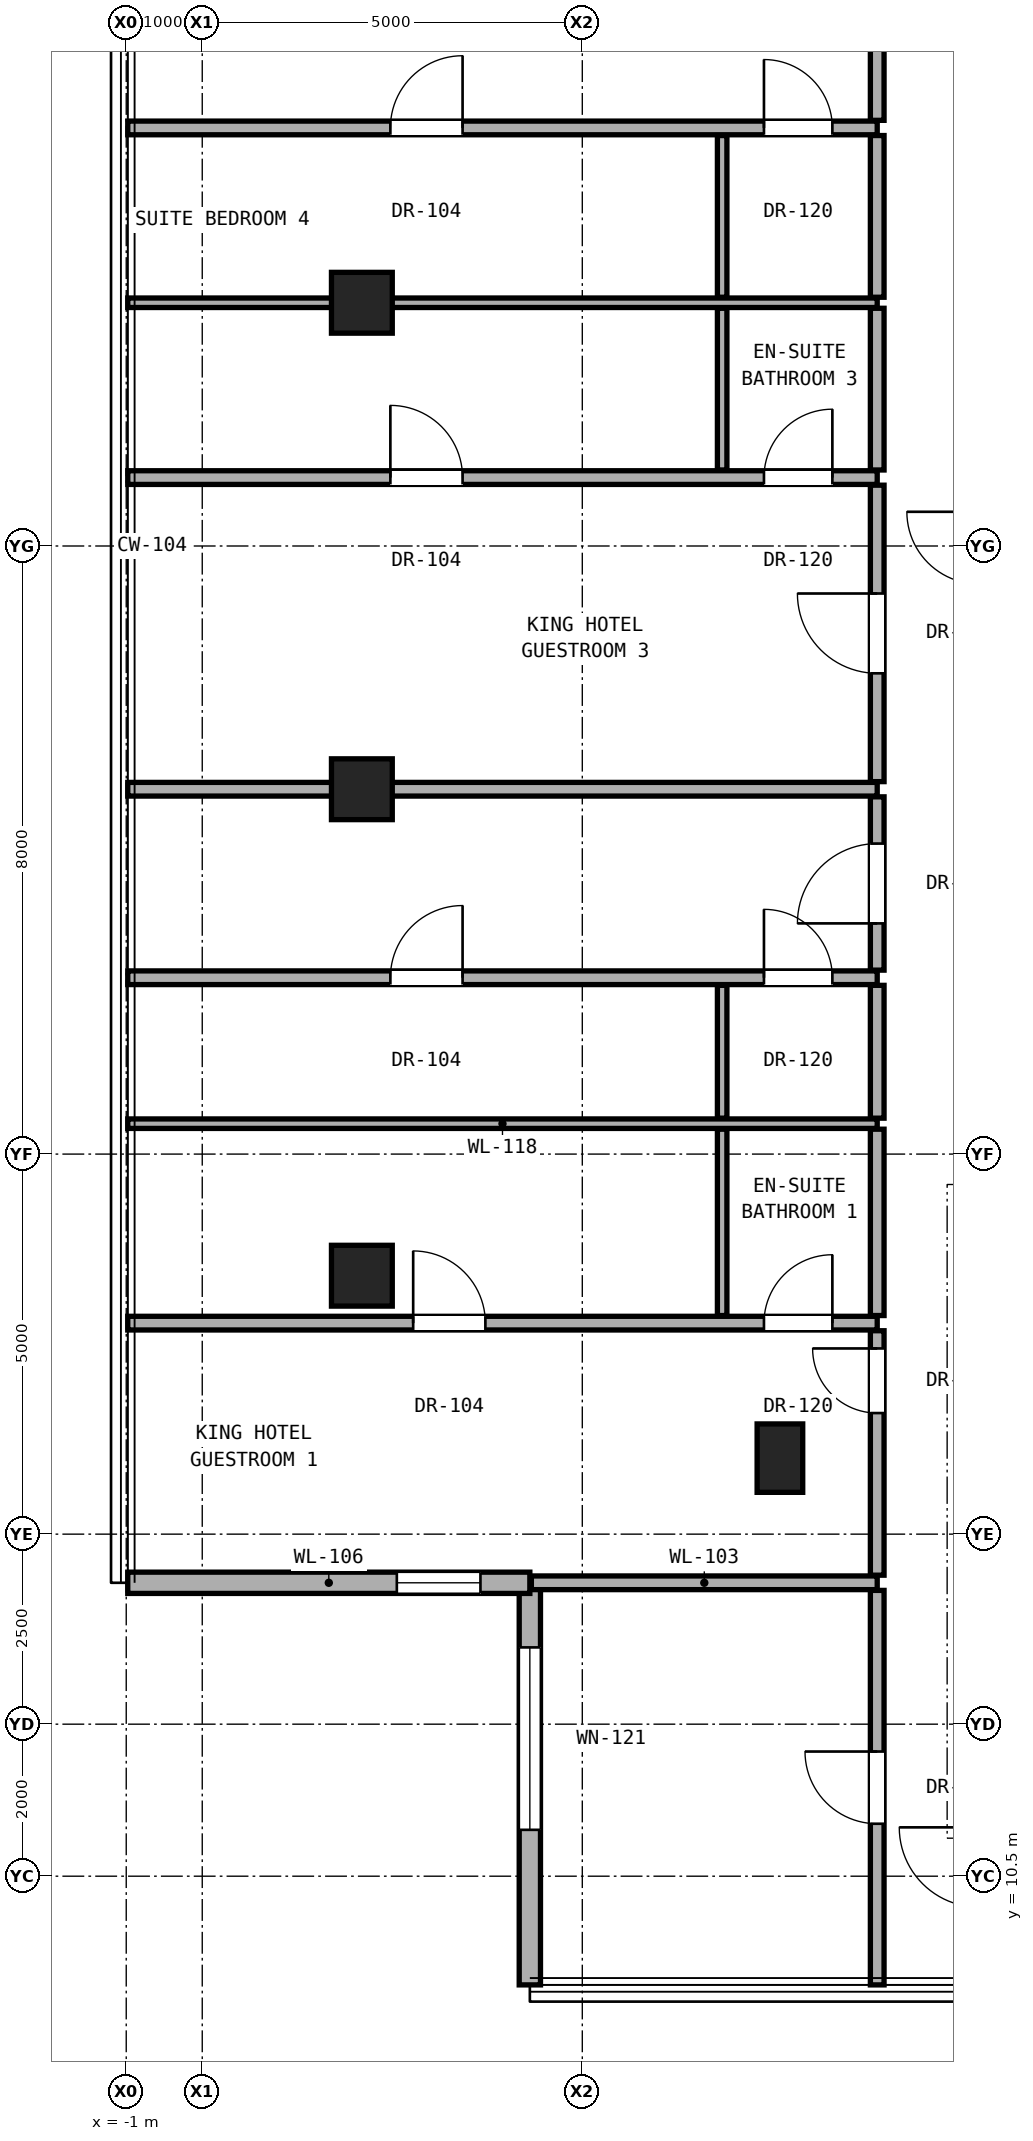
"""IFC4 building model, lengths in metres.
Left out: names, types, materials, properties, quantities, classifications, styles, units other than length and angle.
Written with IfcOpenShell. Run it as: python <this file> out.ifc"""

import sys

from ifc_helpers import new_model, si_unit, direction, frame, frame_2d, origin, origin_2d, place, context, subcontext, project, spatial, rectangle, hollow_rectangle, extrude, element, fill, save


model = new_model("IFC4")
c1 = context("Model", 3, precision=1e-05, world=origin(), true_north=direction((0.0, 1.0)))
c2 = subcontext(c1, "Body", "Model", "MODEL_VIEW")
j1 = project(units=[si_unit("LENGTHUNIT", "METRE"), si_unit("PLANEANGLEUNIT", "RADIAN")], contexts=[c1])
p1 = place(None, origin())
s1 = spatial("IfcSite", under=j1, at=p1, CompositionType="ELEMENT")
p2 = place(p1, origin())
s2 = spatial("IfcBuilding", under=s1, at=p2, CompositionType="ELEMENT")
p3 = place(p2, frame((0.0, 0.0, 235.9)))
s3 = spatial("IfcBuildingStorey", under=s2, at=p3, CompositionType="ELEMENT", Elevation=235.9)
for number, where, z_axis, x_axis in (
    (1, (2.1, 18.4, 0.0), (0.0, 0.0, 1.0), (1.0, 0.0, 0.0)),
    (2, (2.1, 24.8, 0.0), (0.0, 0.0, 1.0), (1.0, 0.0, 0.0)),
    (3, (2.1, 31.2, 0.0), (0.0, 0.0, 1.0), (1.0, 0.0, 0.0)),
):
    element("IfcColumn", number, at=place(p3, frame(where, z_axis=z_axis, x_axis=x_axis)), inside=s3, PredefinedType="COLUMN", context=c2, shape_type="SweptSolid", body=[
        extrude(hollow_rectangle(XDim=0.8, YDim=0.8, WallThickness=0.045, at=origin_2d()), origin(), (0.0, 0.0, 1.0), 3.3),
    ])
p4 = place(p3, frame((7.6, 16.0, 0.0), z_axis=(0.0, 0.0, 1.0), x_axis=(1.0, 0.0, 0.0)))
e4 = element("IfcColumn", 4, at=p4, inside=s3, PredefinedType="PILASTER", context=c2, shape_type="SweptSolid", body=[
    extrude(rectangle(XDim=0.6, YDim=0.9, at=origin_2d()), origin(), (0.0, 0.0, 1.0), 3.3),
])
p5 = place(p3, frame((4.31, 14.36, 0.0), z_axis=(0.0, 0.0, 1.0), x_axis=(0.0, -1.0, 0.0)))
e5 = element("IfcWall", 5, at=p5, inside=s3, PredefinedType="SOLIDWALL", context=c2, shape_type="SweptSolid", body=[
    extrude(rectangle(XDim=5.29, YDim=0.28, at=frame_2d((2.645, 0.0))), origin(), (0.0, 0.0, 1.0), 3.08),
])
p6 = place(p5, frame((0.85, 0.0, 0.58)))
e6 = element("IfcOpeningElement", 6, at=p6, cuts=e5, PredefinedType="OPENING", context=c2, shape_type="SweptSolid", body=[
    extrude(rectangle(XDim=2.4, YDim=2.35, at=frame_2d((1.2, 1.175))), frame((0.0, 0.15, 0.0), z_axis=(0.0, -1.0, 0.0), x_axis=(1.0, 0.0, 0.0)), (0.0, 0.0, 1.0), 0.3),
])
p7 = place(p3, frame((-0.98, 14.36, 0.0), z_axis=(0.0, 0.0, 1.0), x_axis=(1.0, 0.0, 0.0)))
e7 = element("IfcWall", 7, at=p7, inside=s3, PredefinedType="SOLIDWALL", context=c2, shape_type="SweptSolid", body=[
    extrude(rectangle(XDim=5.29, YDim=0.28, at=frame_2d((2.645, 0.0))), origin(), (0.0, 0.0, 1.0), 3.08),
])
p8 = place(p7, frame((3.54, 0.0, 0.85)))
e8 = element("IfcOpeningElement", 8, at=p8, cuts=e7, PredefinedType="OPENING", context=c2, shape_type="SweptSolid", body=[
    extrude(rectangle(XDim=1.1, YDim=2.0, at=frame_2d((0.55, 1.0))), frame((0.0, 0.15, 0.0), z_axis=(0.0, -1.0, 0.0), x_axis=(1.0, 0.0, 0.0)), (0.0, 0.0, 1.0), 0.3),
])
p9 = place(p3, frame((4.33, 14.36, 0.0), z_axis=(0.0, 0.0, 1.0), x_axis=(1.0, 0.0, 0.0)))
e9 = element("IfcWall", 9, at=p9, inside=s3, PredefinedType="PARTITIONING", context=c2, shape_type="SweptSolid", body=[
    extrude(rectangle(XDim=4.55, YDim=0.18, at=frame_2d((2.275, 0.0))), origin(), (0.0, 0.0, 1.0), 3.1),
])
p10 = place(p3, frame((-0.98, 17.776, 0.0), z_axis=(0.0, 0.0, 1.0), x_axis=(1.0, 0.0, 0.0)))
e10 = element("IfcWall", 10, at=p10, inside=s3, PredefinedType="PARTITIONING", context=c2, shape_type="SweptSolid", body=[
    extrude(rectangle(XDim=9.86, YDim=0.18, at=frame_2d((4.93, 0.0))), origin(), (0.0, 0.0, 1.0), 2.543),
])
p11 = place(p10, frame((3.755, 0.0, 0.0)))
e11 = element("IfcOpeningElement", 11, at=p11, cuts=e10, PredefinedType="OPENING", context=c2, shape_type="SweptSolid", body=[
    extrude(rectangle(XDim=0.95, YDim=2.15, at=frame_2d((0.475, 1.075))), frame((0.0, 0.1, 0.0), z_axis=(0.0, -1.0, 0.0), x_axis=(1.0, 0.0, 0.0)), (0.0, 0.0, 1.0), 0.2),
])
p12 = place(p10, frame((8.37, 0.0, 0.0)))
e12 = element("IfcOpeningElement", 12, at=p12, cuts=e10, PredefinedType="OPENING", context=c2, shape_type="SweptSolid", body=[
    extrude(rectangle(XDim=0.9, YDim=2.1, at=frame_2d((0.45, 1.05))), frame((0.0, 0.1, 0.0), z_axis=(0.0, -1.0, 0.0), x_axis=(1.0, 0.0, 0.0)), (0.0, 0.0, 1.0), 0.2),
])
p13 = place(p3, frame((-0.98, 20.4, 0.0), z_axis=(0.0, 0.0, 1.0), x_axis=(1.0, 0.0, 0.0)))
e13 = element("IfcWall", 13, at=p13, inside=s3, PredefinedType="PARTITIONING", context=c2, shape_type="SweptSolid", body=[
    extrude(rectangle(XDim=9.86, YDim=0.125, at=frame_2d((4.93, 0.0))), origin(), (0.0, 0.0, 1.0), 2.319),
])
p14 = place(p3, frame((-0.98, 22.32, 0.0), z_axis=(0.0, 0.0, 1.0), x_axis=(1.0, 0.0, 0.0)))
e14 = element("IfcWall", 14, at=p14, inside=s3, PredefinedType="PARTITIONING", context=c2, shape_type="SweptSolid", body=[
    extrude(rectangle(XDim=9.86, YDim=0.18, at=frame_2d((4.93, 0.0))), origin(), (0.0, 0.0, 1.0), 2.319),
])
p15 = place(p14, frame((3.455, 0.0, 0.0)))
e15 = element("IfcOpeningElement", 15, at=p15, cuts=e14, PredefinedType="OPENING", context=c2, shape_type="SweptSolid", body=[
    extrude(rectangle(XDim=0.95, YDim=2.15, at=frame_2d((0.475, 1.075))), frame((0.0, 0.1, 0.0), z_axis=(0.0, -1.0, 0.0), x_axis=(1.0, 0.0, 0.0)), (0.0, 0.0, 1.0), 0.2),
])
p16 = place(p14, frame((8.37, 0.0, 0.0)))
e16 = element("IfcOpeningElement", 16, at=p16, cuts=e14, PredefinedType="OPENING", context=c2, shape_type="SweptSolid", body=[
    extrude(rectangle(XDim=0.9, YDim=2.1, at=frame_2d((0.45, 1.05))), frame((0.0, 0.1, 0.0), z_axis=(0.0, -1.0, 0.0), x_axis=(1.0, 0.0, 0.0)), (0.0, 0.0, 1.0), 0.2),
])
p17 = place(p3, frame((-0.98, 24.8, 0.0), z_axis=(0.0, 0.0, 1.0), x_axis=(1.0, 0.0, 0.0)))
e17 = element("IfcWall", 17, at=p17, inside=s3, PredefinedType="PARTITIONING", context=c2, shape_type="SweptSolid", body=[
    extrude(rectangle(XDim=9.86, YDim=0.18, at=frame_2d((4.93, 0.0))), origin(), (0.0, 0.0, 1.0), 2.319),
])
p18 = place(p3, frame((-0.98, 28.9, 0.0), z_axis=(0.0, 0.0, 1.0), x_axis=(1.0, 0.0, 0.0)))
e18 = element("IfcWall", 18, at=p18, inside=s3, PredefinedType="PARTITIONING", context=c2, shape_type="SweptSolid", body=[
    extrude(rectangle(XDim=9.86, YDim=0.18, at=frame_2d((4.93, 0.0))), origin(), (0.0, 0.0, 1.0), 2.319),
])
p19 = place(p18, frame((3.455, 0.0, 0.0)))
e19 = element("IfcOpeningElement", 19, at=p19, cuts=e18, PredefinedType="OPENING", context=c2, shape_type="SweptSolid", body=[
    extrude(rectangle(XDim=0.95, YDim=2.15, at=frame_2d((0.475, 1.075))), frame((0.0, 0.1, 0.0), z_axis=(0.0, -1.0, 0.0), x_axis=(1.0, 0.0, 0.0)), (0.0, 0.0, 1.0), 0.2),
])
p20 = place(p18, frame((8.37, 0.0, 0.0)))
e20 = element("IfcOpeningElement", 20, at=p20, cuts=e18, PredefinedType="OPENING", context=c2, shape_type="SweptSolid", body=[
    extrude(rectangle(XDim=0.9, YDim=2.1, at=frame_2d((0.45, 1.05))), frame((0.0, 0.1, 0.0), z_axis=(0.0, -1.0, 0.0), x_axis=(1.0, 0.0, 0.0)), (0.0, 0.0, 1.0), 0.2),
])
p21 = place(p3, frame((-0.98, 31.2, 0.0), z_axis=(0.0, 0.0, 1.0), x_axis=(1.0, 0.0, 0.0)))
e21 = element("IfcWall", 21, at=p21, inside=s3, PredefinedType="PARTITIONING", context=c2, shape_type="SweptSolid", body=[
    extrude(rectangle(XDim=9.86, YDim=0.125, at=frame_2d((4.93, 0.0))), origin(), (0.0, 0.0, 1.0), 2.319),
])
p22 = place(p3, frame((-0.98, 33.5, 0.0), z_axis=(0.0, 0.0, 1.0), x_axis=(1.0, 0.0, 0.0)))
e22 = element("IfcWall", 22, at=p22, inside=s3, PredefinedType="PARTITIONING", context=c2, shape_type="SweptSolid", body=[
    extrude(rectangle(XDim=9.86, YDim=0.18, at=frame_2d((4.93, 0.0))), origin(), (0.0, 0.0, 1.0), 2.319),
])
p23 = place(p22, frame((3.455, 0.0, 0.0)))
e23 = element("IfcOpeningElement", 23, at=p23, cuts=e22, PredefinedType="OPENING", context=c2, shape_type="SweptSolid", body=[
    extrude(rectangle(XDim=0.95, YDim=2.15, at=frame_2d((0.475, 1.075))), frame((0.0, 0.1, 0.0), z_axis=(0.0, -1.0, 0.0), x_axis=(1.0, 0.0, 0.0)), (0.0, 0.0, 1.0), 0.2),
])
p24 = place(p22, frame((8.37, 0.0, 0.0)))
e24 = element("IfcOpeningElement", 24, at=p24, cuts=e22, PredefinedType="OPENING", context=c2, shape_type="SweptSolid", body=[
    extrude(rectangle(XDim=0.9, YDim=2.1, at=frame_2d((0.45, 1.05))), frame((0.0, 0.1, 0.0), z_axis=(0.0, -1.0, 0.0), x_axis=(1.0, 0.0, 0.0)), (0.0, 0.0, 1.0), 0.2),
])
p25 = place(p3, frame((6.84, 17.876, 0.0), z_axis=(0.0, 0.0, 1.0), x_axis=(0.0, 1.0, 0.0)))
e25 = element("IfcWall", 25, at=p25, inside=s3, PredefinedType="PARTITIONING", context=c2, shape_type="SweptSolid", body=[
    extrude(rectangle(XDim=2.451, YDim=0.125, at=frame_2d((1.226, 0.0))), origin(), (0.0, 0.0, 1.0), 2.492),
])
p26 = place(p3, frame((6.84, 20.472, 0.0), z_axis=(0.0, 0.0, 1.0), x_axis=(0.0, 1.0, 0.0)))
e26 = element("IfcWall", 26, at=p26, inside=s3, PredefinedType="PARTITIONING", context=c2, shape_type="SweptSolid", body=[
    extrude(rectangle(XDim=1.748, YDim=0.125, at=frame_2d((0.874, 0.0))), origin(), (0.0, 0.0, 1.0), 3.1),
])
for number, where, z_axis, x_axis in (
    (27, (6.84, 29.0, 0.0), (0.0, 0.0, 1.0), (0.0, 1.0, 0.0)),
    (28, (6.84, 31.272, 0.0), (0.0, 0.0, 1.0), (0.0, 1.0, 0.0)),
):
    element("IfcWall", number, at=place(p3, frame(where, z_axis=z_axis, x_axis=x_axis)), inside=s3, PredefinedType="PARTITIONING", context=c2, shape_type="SweptSolid", body=[
        extrude(rectangle(XDim=2.127, YDim=0.125, at=frame_2d((1.064, 0.0))), origin(), (0.0, 0.0, 1.0), 2.396),
    ])
p27 = place(p3, frame((8.88, 9.07, 0.0), z_axis=(0.0, 0.0, 1.0), x_axis=(0.0, 1.0, 0.0)))
e29 = element("IfcWall", 29, at=p27, inside=s3, PredefinedType="PARTITIONING", context=c2, shape_type="SweptSolid", body=[
    extrude(rectangle(XDim=5.19, YDim=0.18, at=frame_2d((2.595, 0.0))), origin(), (0.0, 0.0, 1.0), 3.1),
])
p28 = place(p27, frame((2.12, 0.0, 0.0)))
e30 = element("IfcOpeningElement", 30, at=p28, cuts=e29, PredefinedType="OPENING", context=c2, shape_type="SweptSolid", body=[
    extrude(rectangle(XDim=0.95, YDim=2.15, at=frame_2d((0.475, 1.075))), frame((0.0, 0.1, 0.0), z_axis=(0.0, -1.0, 0.0), x_axis=(1.0, 0.0, 0.0)), (0.0, 0.0, 1.0), 0.2),
])
p29 = place(p3, frame((8.88, 14.46, 0.0), z_axis=(0.0, 0.0, 1.0), x_axis=(0.0, 1.0, 0.0)))
e31 = element("IfcWall", 31, at=p29, inside=s3, PredefinedType="PARTITIONING", context=c2, shape_type="SweptSolid", body=[
    extrude(rectangle(XDim=3.216, YDim=0.18, at=frame_2d((1.608, 0.0))), origin(), (0.0, 0.0, 1.0), 2.543),
])
p30 = place(p29, frame((2.133, 0.0, 0.0)))
e32 = element("IfcOpeningElement", 32, at=p30, cuts=e31, PredefinedType="OPENING", context=c2, shape_type="SweptSolid", body=[
    extrude(rectangle(XDim=0.85, YDim=2.01, at=frame_2d((0.425, 1.005))), frame((0.0, 0.1, 0.0), z_axis=(0.0, -1.0, 0.0), x_axis=(1.0, 0.0, 0.0)), (0.0, 0.0, 1.0), 0.2),
])
p31 = place(p3, frame((8.88, 17.876, 0.0), z_axis=(0.0, 0.0, 1.0), x_axis=(0.0, 1.0, 0.0)))
e33 = element("IfcWall", 33, at=p31, inside=s3, PredefinedType="PARTITIONING", context=c2, shape_type="SweptSolid", body=[
    extrude(rectangle(XDim=2.451, YDim=0.18, at=frame_2d((1.226, 0.0))), origin(), (0.0, 0.0, 1.0), 2.492),
])
p32 = place(p3, frame((8.88, 20.472, 0.0), z_axis=(0.0, 0.0, 1.0), x_axis=(0.0, 1.0, 0.0)))
e34 = element("IfcWall", 34, at=p32, inside=s3, PredefinedType="PARTITIONING", context=c2, shape_type="SweptSolid", body=[
    extrude(rectangle(XDim=1.748, YDim=0.18, at=frame_2d((0.874, 0.0))), origin(), (0.0, 0.0, 1.0), 3.1),
])
p33 = place(p3, frame((8.88, 22.42, 0.0), z_axis=(0.0, 0.0, 1.0), x_axis=(0.0, 1.0, 0.0)))
e35 = element("IfcWall", 35, at=p33, inside=s3, PredefinedType="PARTITIONING", context=c2, shape_type="SweptSolid", body=[
    extrude(rectangle(XDim=2.28, YDim=0.18, at=frame_2d((1.14, 0.0))), origin(), (0.0, 0.0, 1.0), 2.396),
])
p34 = place(p33, frame((0.615, 0.0, 0.0)))
e36 = element("IfcOpeningElement", 36, at=p34, cuts=e35, PredefinedType="OPENING", context=c2, shape_type="SweptSolid", body=[
    extrude(rectangle(XDim=1.05, YDim=2.2, at=frame_2d((0.525, 1.1))), frame((0.0, 0.1, 0.0), z_axis=(0.0, -1.0, 0.0), x_axis=(1.0, 0.0, 0.0)), (0.0, 0.0, 1.0), 0.2),
])
p35 = place(p3, frame((8.88, 24.9, 0.0), z_axis=(0.0, 0.0, 1.0), x_axis=(0.0, 1.0, 0.0)))
e37 = element("IfcWall", 37, at=p35, inside=s3, PredefinedType="PARTITIONING", context=c2, shape_type="SweptSolid", body=[
    extrude(rectangle(XDim=3.9, YDim=0.18, at=frame_2d((1.95, 0.0))), origin(), (0.0, 0.0, 1.0), 2.396),
])
p36 = place(p35, frame((1.425, 0.0, 0.0)))
e38 = element("IfcOpeningElement", 38, at=p36, cuts=e37, PredefinedType="OPENING", context=c2, shape_type="SweptSolid", body=[
    extrude(rectangle(XDim=1.05, YDim=2.2, at=frame_2d((0.525, 1.1))), frame((0.0, 0.1, 0.0), z_axis=(0.0, -1.0, 0.0), x_axis=(1.0, 0.0, 0.0)), (0.0, 0.0, 1.0), 0.2),
])
for number, where, z_axis, x_axis in (
    (39, (8.88, 29.0, 0.0), (0.0, 0.0, 1.0), (0.0, 1.0, 0.0)),
    (40, (8.88, 31.272, 0.0), (0.0, 0.0, 1.0), (0.0, 1.0, 0.0)),
):
    element("IfcWall", number, at=place(p3, frame(where, z_axis=z_axis, x_axis=x_axis)), inside=s3, PredefinedType="PARTITIONING", context=c2, shape_type="SweptSolid", body=[
        extrude(rectangle(XDim=2.127, YDim=0.18, at=frame_2d((1.064, 0.0))), origin(), (0.0, 0.0, 1.0), 2.396),
    ])
p37 = place(p3, frame((8.88, 33.6, 0.0), z_axis=(0.0, 0.0, 1.0), x_axis=(0.0, 1.0, 0.0)))
e41 = element("IfcWall", 41, at=p37, inside=s3, PredefinedType="PARTITIONING", context=c2, shape_type="SweptSolid", body=[
    extrude(rectangle(XDim=7.94, YDim=0.18, at=frame_2d((3.97, 0.0))), origin(), (0.0, 0.0, 1.0), 2.492),
])
p38 = place(p37, frame((3.445, 0.0, 0.0)))
e42 = element("IfcOpeningElement", 42, at=p38, cuts=e41, PredefinedType="OPENING", context=c2, shape_type="SweptSolid", body=[
    extrude(rectangle(XDim=1.05, YDim=2.2, at=frame_2d((0.525, 1.1))), frame((0.0, 0.1, 0.0), z_axis=(0.0, -1.0, 0.0), x_axis=(1.0, 0.0, 0.0)), (0.0, 0.0, 1.0), 0.2),
])
p39 = place(p6, origin())
e43 = element("IfcWindow", 43, at=p39, inside=s3, PartitioningType="SINGLE_PANEL", PredefinedType="WINDOW", context=c2, shape_type="SweptSolid", body=[
    extrude(rectangle(XDim=2.4, YDim=2.35, at=frame_2d((1.2, 1.175))), frame((0.0, 0.03, 0.0), z_axis=(0.0, -1.0, 0.0), x_axis=(1.0, 0.0, 0.0)), (0.0, 0.0, 1.0), 0.06),
])
fill(e6, e43)
p40 = place(p8, origin())
e44 = element("IfcWindow", 44, at=p40, inside=s3, PartitioningType="SINGLE_PANEL", PredefinedType="WINDOW", context=c2, shape_type="SweptSolid", body=[
    extrude(rectangle(XDim=1.1, YDim=2.0, at=frame_2d((0.55, 1.0))), frame((0.0, 0.03, 0.0), z_axis=(0.0, -1.0, 0.0), x_axis=(1.0, 0.0, 0.0)), (0.0, 0.0, 1.0), 0.06),
])
fill(e8, e44)
p41 = place(p30, origin())
e45 = element("IfcDoor", 45, at=p41, inside=s3, OperationType="SINGLE_SWING_RIGHT", PredefinedType="DOOR", context=c2, shape_type="SweptSolid", body=[
    extrude(rectangle(XDim=0.85, YDim=2.01, at=frame_2d((0.425, 1.005))), frame((0.0, 0.025, 0.0), z_axis=(0.0, -1.0, 0.0), x_axis=(1.0, 0.0, 0.0)), (0.0, 0.0, 1.0), 0.05),
])
fill(e32, e45)
p42 = place(p11, origin())
e46 = element("IfcDoor", 46, at=p42, inside=s3, OperationType="SINGLE_SWING_LEFT", PredefinedType="DOOR", context=c2, shape_type="SweptSolid", body=[
    extrude(rectangle(XDim=0.95, YDim=2.15, at=frame_2d((0.475, 1.075))), frame((0.0, 0.025, 0.0), z_axis=(0.0, -1.0, 0.0), x_axis=(1.0, 0.0, 0.0)), (0.0, 0.0, 1.0), 0.05),
])
fill(e11, e46)
p43 = place(p12, origin())
e47 = element("IfcDoor", 47, at=p43, inside=s3, OperationType="SINGLE_SWING_RIGHT", PredefinedType="DOOR", context=c2, shape_type="SweptSolid", body=[
    extrude(rectangle(XDim=0.9, YDim=2.1, at=frame_2d((0.45, 1.05))), frame((0.0, 0.025, 0.0), z_axis=(0.0, -1.0, 0.0), x_axis=(1.0, 0.0, 0.0)), (0.0, 0.0, 1.0), 0.05),
])
fill(e12, e47)
p44 = place(p34, origin())
e48 = element("IfcDoor", 48, at=p44, inside=s3, OperationType="SINGLE_SWING_LEFT", PredefinedType="DOOR", context=c2, shape_type="SweptSolid", body=[
    extrude(rectangle(XDim=1.05, YDim=2.2, at=frame_2d((0.525, 1.1))), frame((0.0, 0.025, 0.0), z_axis=(0.0, -1.0, 0.0), x_axis=(1.0, 0.0, 0.0)), (0.0, 0.0, 1.0), 0.05),
])
fill(e36, e48)
p45 = place(p15, origin())
e49 = element("IfcDoor", 49, at=p45, inside=s3, OperationType="SINGLE_SWING_RIGHT", PredefinedType="DOOR", context=c2, shape_type="SweptSolid", body=[
    extrude(rectangle(XDim=0.95, YDim=2.15, at=frame_2d((0.475, 1.075))), frame((0.0, 0.025, 0.0), z_axis=(0.0, -1.0, 0.0), x_axis=(1.0, 0.0, 0.0)), (0.0, 0.0, 1.0), 0.05),
])
fill(e15, e49)
p46 = place(p16, origin())
e50 = element("IfcDoor", 50, at=p46, inside=s3, OperationType="SINGLE_SWING_LEFT", PredefinedType="DOOR", context=c2, shape_type="SweptSolid", body=[
    extrude(rectangle(XDim=0.9, YDim=2.1, at=frame_2d((0.45, 1.05))), frame((0.0, 0.025, 0.0), z_axis=(0.0, -1.0, 0.0), x_axis=(1.0, 0.0, 0.0)), (0.0, 0.0, 1.0), 0.05),
])
fill(e16, e50)
p47 = place(p36, origin())
e51 = element("IfcDoor", 51, at=p47, inside=s3, OperationType="SINGLE_SWING_RIGHT", PredefinedType="DOOR", context=c2, shape_type="SweptSolid", body=[
    extrude(rectangle(XDim=1.05, YDim=2.2, at=frame_2d((0.525, 1.1))), frame((0.0, 0.025, 0.0), z_axis=(0.0, -1.0, 0.0), x_axis=(1.0, 0.0, 0.0)), (0.0, 0.0, 1.0), 0.05),
])
fill(e38, e51)
p48 = place(p19, origin())
e52 = element("IfcDoor", 52, at=p48, inside=s3, OperationType="SINGLE_SWING_LEFT", PredefinedType="DOOR", context=c2, shape_type="SweptSolid", body=[
    extrude(rectangle(XDim=0.95, YDim=2.15, at=frame_2d((0.475, 1.075))), frame((0.0, 0.025, 0.0), z_axis=(0.0, -1.0, 0.0), x_axis=(1.0, 0.0, 0.0)), (0.0, 0.0, 1.0), 0.05),
])
fill(e19, e52)
p49 = place(p20, origin())
e53 = element("IfcDoor", 53, at=p49, inside=s3, OperationType="SINGLE_SWING_RIGHT", PredefinedType="DOOR", context=c2, shape_type="SweptSolid", body=[
    extrude(rectangle(XDim=0.9, YDim=2.1, at=frame_2d((0.45, 1.05))), frame((0.0, 0.025, 0.0), z_axis=(0.0, -1.0, 0.0), x_axis=(1.0, 0.0, 0.0)), (0.0, 0.0, 1.0), 0.05),
])
fill(e20, e53)
p50 = place(p23, origin())
e54 = element("IfcDoor", 54, at=p50, inside=s3, OperationType="SINGLE_SWING_RIGHT", PredefinedType="DOOR", context=c2, shape_type="SweptSolid", body=[
    extrude(rectangle(XDim=0.95, YDim=2.15, at=frame_2d((0.475, 1.075))), frame((0.0, 0.025, 0.0), z_axis=(0.0, -1.0, 0.0), x_axis=(1.0, 0.0, 0.0)), (0.0, 0.0, 1.0), 0.05),
])
fill(e23, e54)
p51 = place(p24, origin())
e55 = element("IfcDoor", 55, at=p51, inside=s3, OperationType="SINGLE_SWING_LEFT", PredefinedType="DOOR", context=c2, shape_type="SweptSolid", body=[
    extrude(rectangle(XDim=0.9, YDim=2.1, at=frame_2d((0.45, 1.05))), frame((0.0, 0.025, 0.0), z_axis=(0.0, -1.0, 0.0), x_axis=(1.0, 0.0, 0.0)), (0.0, 0.0, 1.0), 0.05),
])
fill(e24, e55)
p52 = place(p28, origin())
e56 = element("IfcDoor", 56, at=p52, inside=s3, OperationType="SINGLE_SWING_RIGHT", PredefinedType="DOOR", context=c2, shape_type="SweptSolid", body=[
    extrude(rectangle(XDim=0.95, YDim=2.15, at=frame_2d((0.475, 1.075))), frame((0.0, 0.025, 0.0), z_axis=(0.0, -1.0, 0.0), x_axis=(1.0, 0.0, 0.0)), (0.0, 0.0, 1.0), 0.05),
])
fill(e30, e56)
save(model, sys.argv[1])
